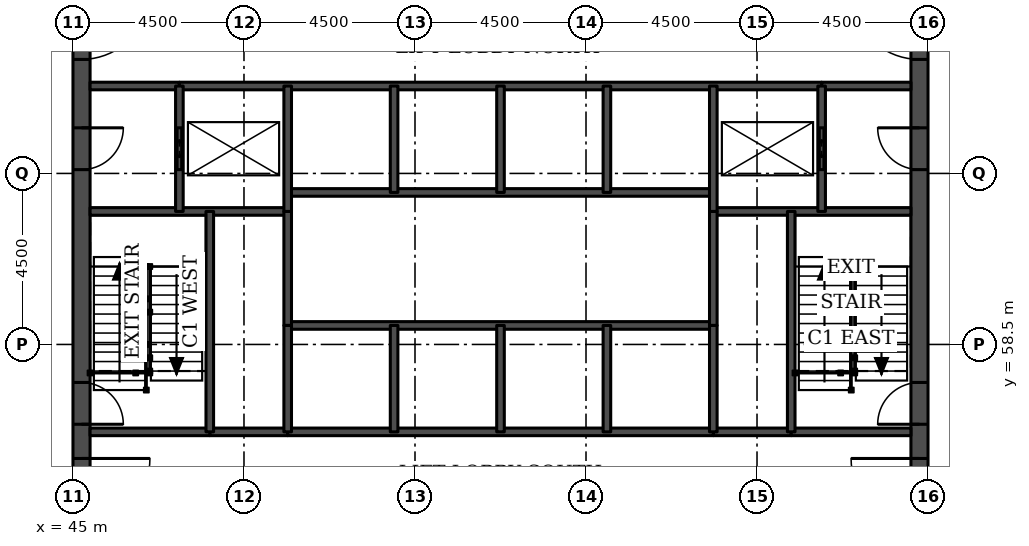
"""IFC4 building model, lengths in metres.
Left out: names, types, materials, properties, quantities, classifications, styles, units other than length and angle.
Written with IfcOpenShell. Run it as: python <this file> out.ifc"""

import sys

from ifc_helpers import new_model, si_unit, direction, frame, frame_2d, origin, place, context, subcontext, project, spatial, rectangle, extrude, element, fill, save


model = new_model("IFC4")
c1 = context("Model", 3, precision=1e-05, world=origin(), true_north=direction((0.0, 1.0)))
c2 = subcontext(c1, "Body", "Model", "MODEL_VIEW")
j1 = project(units=[si_unit("LENGTHUNIT", "METRE"), si_unit("PLANEANGLEUNIT", "RADIAN")], contexts=[c1])
p1 = place(None, origin())
s1 = spatial("IfcSite", under=j1, at=p1, CompositionType="ELEMENT")
p2 = place(p1, origin())
s2 = spatial("IfcBuilding", under=s1, at=p2, CompositionType="ELEMENT")
p3 = place(p2, frame((0.0, 0.0, 86.3)))
s3 = spatial("IfcBuildingStorey", under=s2, at=p3, CompositionType="ELEMENT", Elevation=86.3)
p4 = place(p3, frame((45.225, 49.5, 0.0), z_axis=(0.0, 0.0, 1.0), x_axis=(0.0, 1.0, 0.0)))
e1 = element("IfcWall", 1, at=p4, inside=s3, PredefinedType="SHEAR", context=c2, shape_type="SweptSolid", body=[
    extrude(rectangle(XDim=22.5, YDim=0.45, at=frame_2d((11.25, 0.0))), origin(), (0.0, 0.0, 1.0), 3.7),
])
p5 = place(p4, frame((4.2, 0.0, 0.0)))
e2 = element("IfcOpeningElement", 2, at=p5, cuts=e1, PredefinedType="OPENING", context=c2, shape_type="SweptSolid", body=[
    extrude(rectangle(XDim=1.8, YDim=2.1, at=frame_2d((0.9, 1.05))), frame((0.0, 0.235, 0.0), z_axis=(0.0, -1.0, 0.0), x_axis=(1.0, 0.0, 0.0)), (0.0, 0.0, 1.0), 0.47),
])
p6 = place(p4, frame((6.9, 0.0, 0.0)))
e3 = element("IfcOpeningElement", 3, at=p6, cuts=e1, PredefinedType="OPENING", context=c2, shape_type="SweptSolid", body=[
    extrude(rectangle(XDim=1.1, YDim=2.1, at=frame_2d((0.55, 1.05))), frame((0.0, 0.235, 0.0), z_axis=(0.0, -1.0, 0.0), x_axis=(1.0, 0.0, 0.0)), (0.0, 0.0, 1.0), 0.47),
])
p7 = place(p4, frame((13.6, 0.0, 0.0)))
e4 = element("IfcOpeningElement", 4, at=p7, cuts=e1, PredefinedType="OPENING", context=c2, shape_type="SweptSolid", body=[
    extrude(rectangle(XDim=1.1, YDim=2.1, at=frame_2d((0.55, 1.05))), frame((0.0, 0.235, 0.0), z_axis=(0.0, -1.0, 0.0), x_axis=(1.0, 0.0, 0.0)), (0.0, 0.0, 1.0), 0.47),
])
p8 = place(p4, frame((16.5, 0.0, 0.0)))
e5 = element("IfcOpeningElement", 5, at=p8, cuts=e1, PredefinedType="OPENING", context=c2, shape_type="SweptSolid", body=[
    extrude(rectangle(XDim=1.8, YDim=2.1, at=frame_2d((0.9, 1.05))), frame((0.0, 0.235, 0.0), z_axis=(0.0, -1.0, 0.0), x_axis=(1.0, 0.0, 0.0)), (0.0, 0.0, 1.0), 0.47),
])
p9 = place(p3, frame((67.275, 49.5, 0.0), z_axis=(0.0, 0.0, 1.0), x_axis=(0.0, 1.0, 0.0)))
e6 = element("IfcWall", 6, at=p9, inside=s3, PredefinedType="SHEAR", context=c2, shape_type="SweptSolid", body=[
    extrude(rectangle(XDim=22.5, YDim=0.45, at=frame_2d((11.25, 0.0))), origin(), (0.0, 0.0, 1.0), 3.7),
])
p10 = place(p9, frame((4.2, 0.0, 0.0)))
e7 = element("IfcOpeningElement", 7, at=p10, cuts=e6, PredefinedType="OPENING", context=c2, shape_type="SweptSolid", body=[
    extrude(rectangle(XDim=1.8, YDim=2.1, at=frame_2d((0.9, 1.05))), frame((0.0, 0.235, 0.0), z_axis=(0.0, -1.0, 0.0), x_axis=(1.0, 0.0, 0.0)), (0.0, 0.0, 1.0), 0.47),
])
p11 = place(p9, frame((6.9, 0.0, 0.0)))
e8 = element("IfcOpeningElement", 8, at=p11, cuts=e6, PredefinedType="OPENING", context=c2, shape_type="SweptSolid", body=[
    extrude(rectangle(XDim=1.1, YDim=2.1, at=frame_2d((0.55, 1.05))), frame((0.0, 0.235, 0.0), z_axis=(0.0, -1.0, 0.0), x_axis=(1.0, 0.0, 0.0)), (0.0, 0.0, 1.0), 0.47),
])
p12 = place(p9, frame((13.6, 0.0, 0.0)))
e9 = element("IfcOpeningElement", 9, at=p12, cuts=e6, PredefinedType="OPENING", context=c2, shape_type="SweptSolid", body=[
    extrude(rectangle(XDim=1.1, YDim=2.1, at=frame_2d((0.55, 1.05))), frame((0.0, 0.235, 0.0), z_axis=(0.0, -1.0, 0.0), x_axis=(1.0, 0.0, 0.0)), (0.0, 0.0, 1.0), 0.47),
])
p13 = place(p9, frame((16.5, 0.0, 0.0)))
e10 = element("IfcOpeningElement", 10, at=p13, cuts=e6, PredefinedType="OPENING", context=c2, shape_type="SweptSolid", body=[
    extrude(rectangle(XDim=1.8, YDim=2.1, at=frame_2d((0.9, 1.05))), frame((0.0, 0.235, 0.0), z_axis=(0.0, -1.0, 0.0), x_axis=(1.0, 0.0, 0.0)), (0.0, 0.0, 1.0), 0.47),
])
for number, where, z_axis, x_axis in (
    (11, (48.6, 56.2, 0.0), (0.0, 0.0, 1.0), (1.0, 0.0, 0.0)),
    (12, (61.85, 56.2, 0.0), (0.0, 0.0, 1.0), (1.0, 0.0, 0.0)),
):
    element("IfcWall", number, at=place(p3, frame(where, z_axis=z_axis, x_axis=x_axis)), inside=s3, PredefinedType="SOLIDWALL", context=c2, shape_type="SweptSolid", body=[
        extrude(rectangle(XDim=2.05, YDim=0.2, at=frame_2d((1.025, 0.0))), origin(), (0.0, 0.0, 1.0), 3.55),
    ])
p14 = place(p3, frame((45.45, 56.2, 0.0), z_axis=(0.0, 0.0, 1.0), x_axis=(1.0, 0.0, 0.0)))
e13 = element("IfcWall", 13, at=p14, inside=s3, PredefinedType="SOLIDWALL", context=c2, shape_type="SweptSolid", body=[
    extrude(rectangle(XDim=3.15, YDim=0.2, at=frame_2d((1.575, 0.0))), origin(), (0.0, 0.0, 1.0), 3.55),
])
p15 = place(p3, frame((50.65, 56.2, 0.0), z_axis=(0.0, 0.0, 1.0), x_axis=(1.0, 0.0, 0.0)))
e14 = element("IfcWall", 14, at=p15, inside=s3, PredefinedType="SOLIDWALL", context=c2, shape_type="SweptSolid", body=[
    extrude(rectangle(XDim=11.2, YDim=0.2, at=frame_2d((5.6, 0.0))), origin(), (0.0, 0.0, 1.0), 3.55),
])
p16 = place(p3, frame((63.9, 56.2, 0.0), z_axis=(0.0, 0.0, 1.0), x_axis=(1.0, 0.0, 0.0)))
e15 = element("IfcWall", 15, at=p16, inside=s3, PredefinedType="SOLIDWALL", context=c2, shape_type="SweptSolid", body=[
    extrude(rectangle(XDim=3.15, YDim=0.2, at=frame_2d((1.575, 0.0))), origin(), (0.0, 0.0, 1.0), 3.55),
])
p17 = place(p3, frame((50.65, 59.0, 0.0), z_axis=(0.0, 0.0, 1.0), x_axis=(1.0, 0.0, 0.0)))
e16 = element("IfcWall", 16, at=p17, inside=s3, PredefinedType="SOLIDWALL", context=c2, shape_type="SweptSolid", body=[
    extrude(rectangle(XDim=11.2, YDim=0.2, at=frame_2d((5.6, 0.0))), origin(), (0.0, 0.0, 1.0), 3.7),
])
for number, where, z_axis, x_axis in (
    (17, (45.45, 62.0, 0.0), (0.0, 0.0, 1.0), (1.0, 0.0, 0.0)),
    (18, (61.85, 62.0, 0.0), (0.0, 0.0, 1.0), (1.0, 0.0, 0.0)),
):
    element("IfcWall", number, at=place(p3, frame(where, z_axis=z_axis, x_axis=x_axis)), inside=s3, PredefinedType="SOLIDWALL", context=c2, shape_type="SweptSolid", body=[
        extrude(rectangle(XDim=5.2, YDim=0.2, at=frame_2d((2.6, 0.0))), origin(), (0.0, 0.0, 1.0), 3.55),
    ])
p18 = place(p3, frame((50.65, 62.5, 0.0), z_axis=(0.0, 0.0, 1.0), x_axis=(1.0, 0.0, 0.0)))
e19 = element("IfcWall", 19, at=p18, inside=s3, PredefinedType="SOLIDWALL", context=c2, shape_type="SweptSolid", body=[
    extrude(rectangle(XDim=11.2, YDim=0.2, at=frame_2d((5.6, 0.0))), origin(), (0.0, 0.0, 1.0), 3.7),
])
for number, where, z_axis, x_axis in (
    (20, (45.45, 65.3, 0.0), (0.0, 0.0, 1.0), (1.0, 0.0, 0.0)),
    (21, (64.7, 65.3, 0.0), (0.0, 0.0, 1.0), (1.0, 0.0, 0.0)),
):
    element("IfcWall", number, at=place(p3, frame(where, z_axis=z_axis, x_axis=x_axis)), inside=s3, PredefinedType="SOLIDWALL", context=c2, shape_type="SweptSolid", body=[
        extrude(rectangle(XDim=2.35, YDim=0.2, at=frame_2d((1.175, 0.0))), origin(), (0.0, 0.0, 1.0), 3.55),
    ])
p19 = place(p3, frame((47.8, 65.3, 0.0), z_axis=(0.0, 0.0, 1.0), x_axis=(1.0, 0.0, 0.0)))
e22 = element("IfcWall", 22, at=p19, inside=s3, PredefinedType="SOLIDWALL", context=c2, shape_type="SweptSolid", body=[
    extrude(rectangle(XDim=16.9, YDim=0.2, at=frame_2d((8.45, 0.0))), origin(), (0.0, 0.0, 1.0), 3.55),
])
p20 = place(p3, frame((47.8, 62.0, 0.0), z_axis=(0.0, 0.0, 1.0), x_axis=(0.0, 1.0, 0.0)))
e23 = element("IfcWall", 23, at=p20, inside=s3, PredefinedType="SOLIDWALL", context=c2, shape_type="SweptSolid", body=[
    extrude(rectangle(XDim=3.3, YDim=0.2, at=frame_2d((1.65, 0.0))), origin(), (0.0, 0.0, 1.0), 3.55),
])
p21 = place(p20, frame((1.1, 0.0, 0.0)))
e24 = element("IfcOpeningElement", 24, at=p21, cuts=e23, PredefinedType="OPENING", context=c2, shape_type="SweptSolid", body=[
    extrude(rectangle(XDim=1.1, YDim=2.1, at=frame_2d((0.55, 1.05))), frame((0.0, 0.11, 0.0), z_axis=(0.0, -1.0, 0.0), x_axis=(1.0, 0.0, 0.0)), (0.0, 0.0, 1.0), 0.22),
])
p22 = place(p3, frame((48.6, 56.2, 0.0), z_axis=(0.0, 0.0, 1.0), x_axis=(0.0, 1.0, 0.0)))
e25 = element("IfcWall", 25, at=p22, inside=s3, PredefinedType="SOLIDWALL", context=c2, shape_type="SweptSolid", body=[
    extrude(rectangle(XDim=5.8, YDim=0.2, at=frame_2d((2.9, 0.0))), origin(), (0.0, 0.0, 1.0), 3.55),
])
p23 = place(p3, frame((50.65, 59.0, 0.0), z_axis=(0.0, 0.0, 1.0), x_axis=(0.0, 1.0, 0.0)))
e26 = element("IfcWall", 26, at=p23, inside=s3, PredefinedType="SOLIDWALL", context=c2, shape_type="SweptSolid", body=[
    extrude(rectangle(XDim=3.0, YDim=0.2, at=frame_2d((1.5, 0.0))), origin(), (0.0, 0.0, 1.0), 3.7),
])
p24 = place(p3, frame((50.65, 56.2, 0.0), z_axis=(0.0, 0.0, 1.0), x_axis=(0.0, 1.0, 0.0)))
e27 = element("IfcWall", 27, at=p24, inside=s3, PredefinedType="SOLIDWALL", context=c2, shape_type="SweptSolid", body=[
    extrude(rectangle(XDim=2.8, YDim=0.2, at=frame_2d((1.4, 0.0))), origin(), (0.0, 0.0, 1.0), 3.55),
])
p25 = place(p3, frame((50.65, 62.0, 0.0), z_axis=(0.0, 0.0, 1.0), x_axis=(0.0, 1.0, 0.0)))
e28 = element("IfcWall", 28, at=p25, inside=s3, PredefinedType="SOLIDWALL", context=c2, shape_type="SweptSolid", body=[
    extrude(rectangle(XDim=3.3, YDim=0.2, at=frame_2d((1.65, 0.0))), origin(), (0.0, 0.0, 1.0), 3.55),
])
for number, where, z_axis, x_axis in (
    (29, (53.45, 56.2, 0.0), (0.0, 0.0, 1.0), (0.0, 1.0, 0.0)),
    (30, (53.45, 62.5, 0.0), (0.0, 0.0, 1.0), (0.0, 1.0, 0.0)),
    (31, (56.25, 56.2, 0.0), (0.0, 0.0, 1.0), (0.0, 1.0, 0.0)),
    (32, (56.25, 62.5, 0.0), (0.0, 0.0, 1.0), (0.0, 1.0, 0.0)),
    (33, (59.05, 56.2, 0.0), (0.0, 0.0, 1.0), (0.0, 1.0, 0.0)),
    (34, (59.05, 62.5, 0.0), (0.0, 0.0, 1.0), (0.0, 1.0, 0.0)),
):
    element("IfcWall", number, at=place(p3, frame(where, z_axis=z_axis, x_axis=x_axis)), inside=s3, PredefinedType="SOLIDWALL", context=c2, shape_type="SweptSolid", body=[
        extrude(rectangle(XDim=2.8, YDim=0.2, at=frame_2d((1.4, 0.0))), origin(), (0.0, 0.0, 1.0), 3.55),
    ])
p26 = place(p3, frame((61.85, 59.0, 0.0), z_axis=(0.0, 0.0, 1.0), x_axis=(0.0, 1.0, 0.0)))
e35 = element("IfcWall", 35, at=p26, inside=s3, PredefinedType="SOLIDWALL", context=c2, shape_type="SweptSolid", body=[
    extrude(rectangle(XDim=3.0, YDim=0.2, at=frame_2d((1.5, 0.0))), origin(), (0.0, 0.0, 1.0), 3.7),
])
p27 = place(p3, frame((61.85, 56.2, 0.0), z_axis=(0.0, 0.0, 1.0), x_axis=(0.0, 1.0, 0.0)))
e36 = element("IfcWall", 36, at=p27, inside=s3, PredefinedType="SOLIDWALL", context=c2, shape_type="SweptSolid", body=[
    extrude(rectangle(XDim=2.8, YDim=0.2, at=frame_2d((1.4, 0.0))), origin(), (0.0, 0.0, 1.0), 3.55),
])
p28 = place(p3, frame((61.85, 62.0, 0.0), z_axis=(0.0, 0.0, 1.0), x_axis=(0.0, 1.0, 0.0)))
e37 = element("IfcWall", 37, at=p28, inside=s3, PredefinedType="SOLIDWALL", context=c2, shape_type="SweptSolid", body=[
    extrude(rectangle(XDim=3.3, YDim=0.2, at=frame_2d((1.65, 0.0))), origin(), (0.0, 0.0, 1.0), 3.55),
])
p29 = place(p3, frame((63.9, 56.2, 0.0), z_axis=(0.0, 0.0, 1.0), x_axis=(0.0, 1.0, 0.0)))
e38 = element("IfcWall", 38, at=p29, inside=s3, PredefinedType="SOLIDWALL", context=c2, shape_type="SweptSolid", body=[
    extrude(rectangle(XDim=5.8, YDim=0.2, at=frame_2d((2.9, 0.0))), origin(), (0.0, 0.0, 1.0), 3.55),
])
p30 = place(p3, frame((64.7, 62.0, 0.0), z_axis=(0.0, 0.0, 1.0), x_axis=(0.0, 1.0, 0.0)))
e39 = element("IfcWall", 39, at=p30, inside=s3, PredefinedType="SOLIDWALL", context=c2, shape_type="SweptSolid", body=[
    extrude(rectangle(XDim=3.3, YDim=0.2, at=frame_2d((1.65, 0.0))), origin(), (0.0, 0.0, 1.0), 3.55),
])
p31 = place(p30, frame((1.1, 0.0, 0.0)))
e40 = element("IfcOpeningElement", 40, at=p31, cuts=e39, PredefinedType="OPENING", context=c2, shape_type="SweptSolid", body=[
    extrude(rectangle(XDim=1.1, YDim=2.1, at=frame_2d((0.55, 1.05))), frame((0.0, 0.11, 0.0), z_axis=(0.0, -1.0, 0.0), x_axis=(1.0, 0.0, 0.0)), (0.0, 0.0, 1.0), 0.22),
])
p32 = place(p21, origin())
e41 = element("IfcDoor", 41, at=p32, inside=s3, OperationType="DOUBLE_DOOR_SLIDING", PredefinedType="DOOR", context=c2, shape_type="SweptSolid", body=[
    extrude(rectangle(XDim=1.1, YDim=2.1, at=frame_2d((0.55, 1.05))), frame((0.0, 0.025, 0.0), z_axis=(0.0, -1.0, 0.0), x_axis=(1.0, 0.0, 0.0)), (0.0, 0.0, 1.0), 0.05),
])
fill(e24, e41)
p33 = place(p31, origin())
e42 = element("IfcDoor", 42, at=p33, inside=s3, OperationType="DOUBLE_DOOR_SLIDING", PredefinedType="DOOR", context=c2, shape_type="SweptSolid", body=[
    extrude(rectangle(XDim=1.1, YDim=2.1, at=frame_2d((0.55, 1.05))), frame((0.0, 0.025, 0.0), z_axis=(0.0, -1.0, 0.0), x_axis=(1.0, 0.0, 0.0)), (0.0, 0.0, 1.0), 0.05),
])
fill(e40, e42)
p34 = place(p5, frame((1.8, 0.0, 0.0), z_axis=(0.0, 0.0, 1.0), x_axis=(-1.0, 0.0, 0.0)))
e43 = element("IfcDoor", 43, at=p34, inside=s3, OperationType="SINGLE_SWING_LEFT", PredefinedType="DOOR", context=c2, shape_type="SweptSolid", body=[
    extrude(rectangle(XDim=1.8, YDim=2.1, at=frame_2d((0.9, 1.05))), frame((0.0, 0.025, 0.0), z_axis=(0.0, -1.0, 0.0), x_axis=(1.0, 0.0, 0.0)), (0.0, 0.0, 1.0), 0.05),
])
fill(e2, e43)
p35 = place(p6, frame((1.1, 0.0, 0.0), z_axis=(0.0, 0.0, 1.0), x_axis=(-1.0, 0.0, 0.0)))
e44 = element("IfcDoor", 44, at=p35, inside=s3, OperationType="SINGLE_SWING_RIGHT", PredefinedType="DOOR", context=c2, shape_type="SweptSolid", body=[
    extrude(rectangle(XDim=1.1, YDim=2.1, at=frame_2d((0.55, 1.05))), frame((0.0, 0.025, 0.0), z_axis=(0.0, -1.0, 0.0), x_axis=(1.0, 0.0, 0.0)), (0.0, 0.0, 1.0), 0.05),
])
fill(e3, e44)
p36 = place(p7, frame((1.1, 0.0, 0.0), z_axis=(0.0, 0.0, 1.0), x_axis=(-1.0, 0.0, 0.0)))
e45 = element("IfcDoor", 45, at=p36, inside=s3, OperationType="SINGLE_SWING_LEFT", PredefinedType="DOOR", context=c2, shape_type="SweptSolid", body=[
    extrude(rectangle(XDim=1.1, YDim=2.1, at=frame_2d((0.55, 1.05))), frame((0.0, 0.025, 0.0), z_axis=(0.0, -1.0, 0.0), x_axis=(1.0, 0.0, 0.0)), (0.0, 0.0, 1.0), 0.05),
])
fill(e4, e45)
p37 = place(p8, frame((1.8, 0.0, 0.0), z_axis=(0.0, 0.0, 1.0), x_axis=(-1.0, 0.0, 0.0)))
e46 = element("IfcDoor", 46, at=p37, inside=s3, OperationType="SINGLE_SWING_LEFT", PredefinedType="DOOR", context=c2, shape_type="SweptSolid", body=[
    extrude(rectangle(XDim=1.8, YDim=2.1, at=frame_2d((0.9, 1.05))), frame((0.0, 0.025, 0.0), z_axis=(0.0, -1.0, 0.0), x_axis=(1.0, 0.0, 0.0)), (0.0, 0.0, 1.0), 0.05),
])
fill(e5, e46)
p38 = place(p10, origin())
e47 = element("IfcDoor", 47, at=p38, inside=s3, OperationType="SINGLE_SWING_RIGHT", PredefinedType="DOOR", context=c2, shape_type="SweptSolid", body=[
    extrude(rectangle(XDim=1.8, YDim=2.1, at=frame_2d((0.9, 1.05))), frame((0.0, 0.025, 0.0), z_axis=(0.0, -1.0, 0.0), x_axis=(1.0, 0.0, 0.0)), (0.0, 0.0, 1.0), 0.05),
])
fill(e7, e47)
p39 = place(p11, origin())
e48 = element("IfcDoor", 48, at=p39, inside=s3, OperationType="SINGLE_SWING_LEFT", PredefinedType="DOOR", context=c2, shape_type="SweptSolid", body=[
    extrude(rectangle(XDim=1.1, YDim=2.1, at=frame_2d((0.55, 1.05))), frame((0.0, 0.025, 0.0), z_axis=(0.0, -1.0, 0.0), x_axis=(1.0, 0.0, 0.0)), (0.0, 0.0, 1.0), 0.05),
])
fill(e8, e48)
p40 = place(p12, origin())
e49 = element("IfcDoor", 49, at=p40, inside=s3, OperationType="SINGLE_SWING_RIGHT", PredefinedType="DOOR", context=c2, shape_type="SweptSolid", body=[
    extrude(rectangle(XDim=1.1, YDim=2.1, at=frame_2d((0.55, 1.05))), frame((0.0, 0.025, 0.0), z_axis=(0.0, -1.0, 0.0), x_axis=(1.0, 0.0, 0.0)), (0.0, 0.0, 1.0), 0.05),
])
fill(e9, e49)
p41 = place(p13, origin())
e50 = element("IfcDoor", 50, at=p41, inside=s3, OperationType="SINGLE_SWING_RIGHT", PredefinedType="DOOR", context=c2, shape_type="SweptSolid", body=[
    extrude(rectangle(XDim=1.8, YDim=2.1, at=frame_2d((0.9, 1.05))), frame((0.0, 0.025, 0.0), z_axis=(0.0, -1.0, 0.0), x_axis=(1.0, 0.0, 0.0)), (0.0, 0.0, 1.0), 0.05),
])
fill(e10, e50)
save(model, sys.argv[1])
